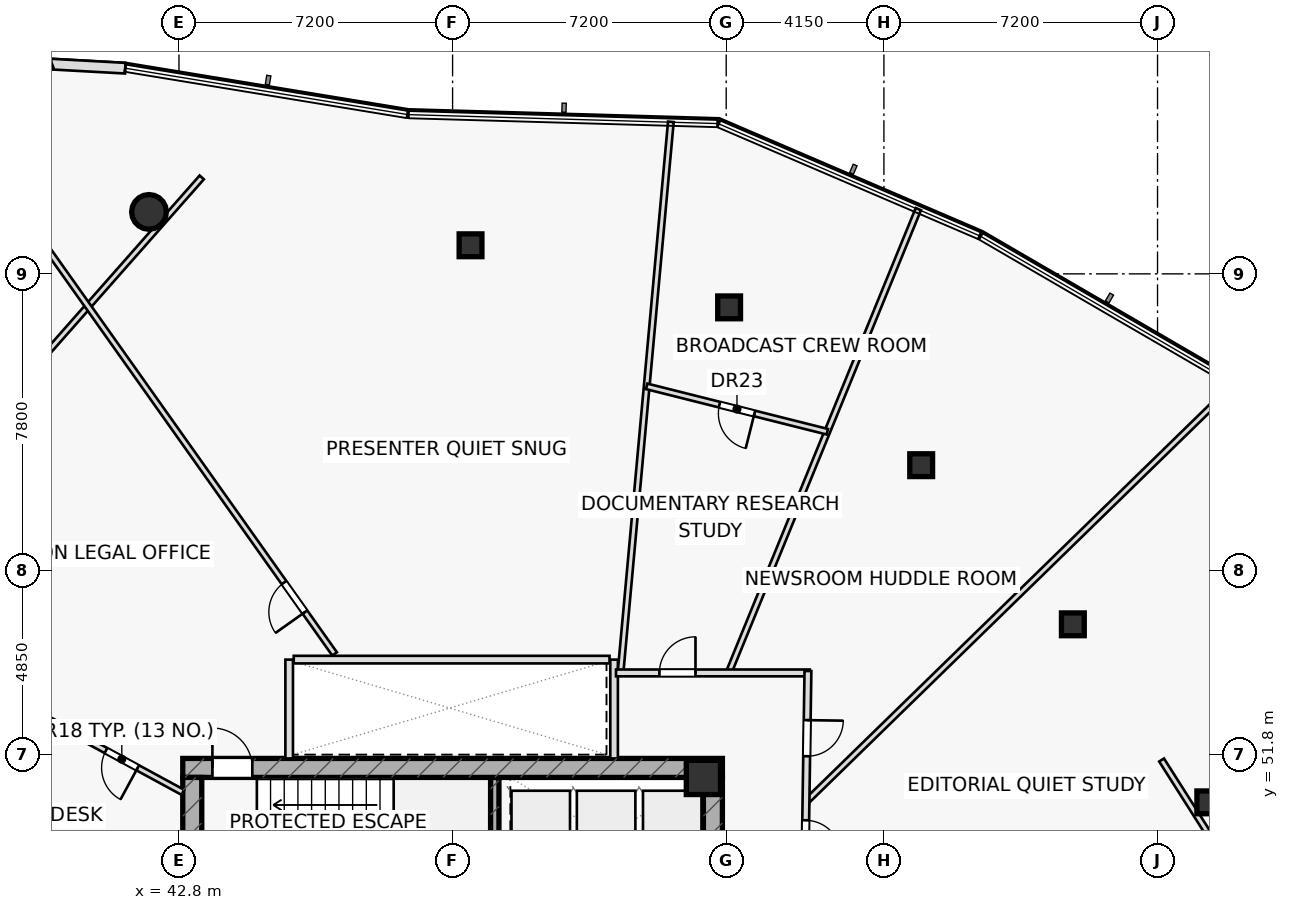
"""IFC4 building model, lengths in metres.
Left out: names, types, materials, properties, quantities, classifications, styles, units other than length and angle.
Written with IfcOpenShell. Run it as: python <this file> out.ifc"""

import sys

from ifc_helpers import new_model, si_unit, direction, frame, frame_2d, origin, origin_2d, place, context, subcontext, project, spatial, rectangle, hollow_rectangle, hollow_circle, extrude, element, fill, save


model = new_model("IFC4")
c1 = context("Model", 3, precision=1e-05, world=origin(), true_north=direction((0.0, 1.0)))
c2 = subcontext(c1, "Body", "Model", "MODEL_VIEW")
j1 = project(units=[si_unit("LENGTHUNIT", "METRE"), si_unit("PLANEANGLEUNIT", "RADIAN")], contexts=[c1])
p1 = place(None, origin())
s1 = spatial("IfcSite", under=j1, at=p1, CompositionType="ELEMENT")
p2 = place(p1, origin())
s2 = spatial("IfcBuilding", under=s1, at=p2, CompositionType="ELEMENT")
p3 = place(p2, frame((0.0, 0.0, 173.35)))
s3 = spatial("IfcBuildingStorey", under=s2, at=p3, CompositionType="ELEMENT", Elevation=173.35)
p4 = place(p3, frame((51.11, 48.1, 0.0), z_axis=(0.0, 0.0, 1.0), x_axis=(0.0, 1.0, 0.0)))
e1 = element("IfcWall", 1, at=p4, inside=s3, PredefinedType="SHEAR", context=c2, shape_type="SweptSolid", body=[
    extrude(rectangle(XDim=3.1, YDim=0.22, at=frame_2d((1.55, 0.0))), origin(), (0.0, 0.0, 1.0), 3.55),
])
p5 = place(p3, frame((42.9, 51.45, 0.0), z_axis=(0.0, 0.0, 1.0), x_axis=(1.0, 0.0, 0.0)))
e2 = element("IfcWall", 2, at=p5, inside=s3, PredefinedType="SHEAR", context=c2, shape_type="SweptSolid", body=[
    extrude(rectangle(XDim=14.2, YDim=0.5, at=frame_2d((7.1, 0.0))), origin(), (0.0, 0.0, 1.0), 3.55),
])
p6 = place(p5, frame((0.78, 0.0, 0.0)))
e3 = element("IfcOpeningElement", 3, at=p6, cuts=e2, PredefinedType="OPENING", context=c2, shape_type="SweptSolid", body=[
    extrude(rectangle(XDim=1.05, YDim=2.2, at=frame_2d((0.525, 1.1))), frame((0.0, 0.26, 0.0), z_axis=(0.0, -1.0, 0.0), x_axis=(1.0, 0.0, 0.0)), (0.0, 0.0, 1.0), 0.52),
])
p7 = place(p3, frame((43.15, 38.8, 0.0), z_axis=(0.0, 0.0, 1.0), x_axis=(0.0, 1.0, 0.0)))
e4 = element("IfcWall", 4, at=p7, inside=s3, PredefinedType="SHEAR", context=c2, shape_type="SweptSolid", body=[
    extrude(rectangle(XDim=12.4, YDim=0.5, at=frame_2d((6.2, 0.0))), origin(), (0.0, 0.0, 1.0), 3.55),
])
p8 = place(p3, frame((56.85, 38.8, 0.0), z_axis=(0.0, 0.0, 1.0), x_axis=(0.0, 1.0, 0.0)))
e5 = element("IfcWall", 5, at=p8, inside=s3, PredefinedType="SHEAR", context=c2, shape_type="SweptSolid", body=[
    extrude(rectangle(XDim=12.4, YDim=0.5, at=frame_2d((6.2, 0.0))), origin(), (0.0, 0.0, 1.0), 3.55),
])
p9 = place(p8, frame((3.85, 0.0, 0.0)))
e6 = element("IfcOpeningElement", 6, at=p9, cuts=e5, PredefinedType="OPENING", context=c2, shape_type="SweptSolid", body=[
    extrude(rectangle(XDim=1.5, YDim=2.2, at=frame_2d((0.75, 1.1))), frame((0.0, 0.26, 0.0), z_axis=(0.0, -1.0, 0.0), x_axis=(1.0, 0.0, 0.0)), (0.0, 0.0, 1.0), 0.52),
])
p10 = place(p3, frame((56.6, 51.2, 0.0), z_axis=(0.0, 0.0, 1.0), x_axis=(1.0, 0.0, 0.0)))
e7 = element("IfcColumn", 7, at=p10, inside=s3, PredefinedType="COLUMN", context=c2, shape_type="SweptSolid", body=[
    extrude(rectangle(XDim=0.9, YDim=0.9, at=origin_2d()), origin(), (0.0, 0.0, 1.0), 3.55),
])
p11 = place(p3, frame((42.011, 66.08, 0.0), z_axis=(0.0, 0.0, 1.0), x_axis=(1.0, 0.0, 0.0)))
e8 = element("IfcColumn", 8, at=p11, inside=s3, PredefinedType="COLUMN", context=c2, shape_type="SweptSolid", body=[
    extrude(hollow_circle(Radius=0.457, WallThickness=0.04, at=origin_2d()), origin(), (0.0, 0.0, 1.0), 3.55),
])
for number, where, z_axis, x_axis in (
    (9, (69.886, 50.544, 0.0), (0.0, 0.0, 1.0), (1.0, 0.0, 0.0)),
    (10, (66.322, 55.229, 0.0), (0.0, 0.0, 1.0), (1.0, 0.0, 0.0)),
    (11, (62.331, 59.416, 0.0), (0.0, 0.0, 1.0), (1.0, 0.0, 0.0)),
    (12, (57.277, 63.568, 0.0), (0.0, 0.0, 1.0), (1.0, 0.0, 0.0)),
    (13, (50.472, 65.202, 0.0), (0.0, 0.0, 1.0), (1.0, 0.0, 0.0)),
):
    element("IfcColumn", number, at=place(p3, frame(where, z_axis=z_axis, x_axis=x_axis)), inside=s3, PredefinedType="COLUMN", context=c2, shape_type="SweptSolid", body=[
        extrude(hollow_rectangle(XDim=0.6, YDim=0.6, WallThickness=0.036, at=origin_2d()), origin(), (0.0, 0.0, 1.0), 3.55),
    ])
for number, where, z_axis, x_axis in (
    (14, (45.7, 51.7, 0.0), (0.0, 0.0, 1.0), (0.0, 1.0, 0.0)),
    (15, (54.25, 51.7, 0.0), (0.0, 0.0, 1.0), (0.0, 1.0, 0.0)),
):
    element("IfcWall", number, at=place(p3, frame(where, z_axis=z_axis, x_axis=x_axis)), inside=s3, PredefinedType="PARTITIONING", context=c2, shape_type="SweptSolid", body=[
        extrude(rectangle(XDim=2.6, YDim=0.2, at=frame_2d((1.3, 0.0))), origin(), (0.0, 0.0, 1.0), 3.55),
    ])
p12 = place(p3, frame((43.4, 66.989, 0.0), z_axis=(0.0, 0.0, 1.0), x_axis=(-0.661622343701, -0.749837231881, 0.0)))
e16 = element("IfcWall", 16, at=p12, inside=s3, PredefinedType="PARTITIONING", context=c2, shape_type="SweptSolid", body=[
    extrude(rectangle(XDim=11.427, YDim=0.15, at=frame_2d((5.714, 0.0))), origin(), (0.0, 0.0, 1.0), 2.935),
])
p13 = place(p3, frame((74.163, 42.993, 0.0), z_axis=(0.0, 0.0, 1.0), x_axis=(-0.53628142437, 0.844039237166, 0.0)))
e17 = element("IfcWall", 17, at=p13, inside=s3, PredefinedType="PARTITIONING", context=c2, shape_type="SweptSolid", body=[
    extrude(rectangle(XDim=10.267, YDim=0.15, at=frame_2d((5.133, 0.0))), origin(), (0.0, 0.0, 1.0), 2.935),
])
p14 = place(p3, frame((42.9, 50.81, 0.0), z_axis=(0.0, 0.0, 1.0), x_axis=(-0.878812674831, 0.477166933637, 0.0)))
e18 = element("IfcWall", 18, at=p14, inside=s3, PredefinedType="PARTITIONING", context=c2, shape_type="SweptSolid", body=[
    extrude(rectangle(XDim=10.765, YDim=0.15, at=frame_2d((5.383, 0.0))), origin(), (0.0, 0.0, 1.0), 2.935),
])
p15 = place(p14, frame((1.35, 0.0, 0.0)))
e19 = element("IfcOpeningElement", 19, at=p15, cuts=e18, PredefinedType="OPENING", context=c2, shape_type="SweptSolid", body=[
    extrude(rectangle(XDim=0.95, YDim=2.05, at=frame_2d((0.475, 1.025))), frame((0.0, 0.085, 0.0), z_axis=(0.0, -1.0, 0.0), x_axis=(1.0, 0.0, 0.0)), (0.0, 0.0, 1.0), 0.17),
])
p16 = place(p3, frame((59.299, 50.556, 0.0), z_axis=(0.0, 0.0, 1.0), x_axis=(0.716060673245, 0.698038044975, 0.0)))
e20 = element("IfcWall", 20, at=p16, inside=s3, PredefinedType="PARTITIONING", context=c2, shape_type="SweptSolid", body=[
    extrude(rectangle(XDim=15.673, YDim=0.15, at=frame_2d((7.836, 0.0))), origin(), (0.0, 0.0, 1.0), 2.935),
])
p17 = place(p3, frame((57.262, 53.95, 0.0), z_axis=(0.0, 0.0, 1.0), x_axis=(0.378711423927, 0.925514806682, 0.0)))
e21 = element("IfcWall", 21, at=p17, inside=s3, PredefinedType="PARTITIONING", context=c2, shape_type="SweptSolid", body=[
    extrude(rectangle(XDim=13.187, YDim=0.15, at=frame_2d((6.593, 0.0))), origin(), (0.0, 0.0, 1.0), 3.025),
])
p18 = place(p3, frame((54.418, 53.95, 0.0), z_axis=(0.0, 0.0, 1.0), x_axis=(0.091045205829, 0.995846760549, 0.0)))
e22 = element("IfcWall", 22, at=p18, inside=s3, PredefinedType="PARTITIONING", context=c2, shape_type="SweptSolid", body=[
    extrude(rectangle(XDim=14.561, YDim=0.15, at=frame_2d((7.28, 0.0))), origin(), (0.0, 0.0, 1.0), 2.935),
])
p19 = place(p3, frame((46.896, 54.45, 0.0), z_axis=(0.0, 0.0, 1.0), x_axis=(-0.578632017692, 0.815588737111, 0.0)))
e23 = element("IfcWall", 23, at=p19, inside=s3, PredefinedType="PARTITIONING", context=c2, shape_type="SweptSolid", body=[
    extrude(rectangle(XDim=17.264, YDim=0.15, at=frame_2d((8.632, 0.0))), origin(), (0.0, 0.0, 1.0), 2.935),
])
p20 = place(p19, frame((1.35, 0.0, 0.0)))
e24 = element("IfcOpeningElement", 24, at=p20, cuts=e23, PredefinedType="OPENING", context=c2, shape_type="SweptSolid", body=[
    extrude(rectangle(XDim=0.95, YDim=2.05, at=frame_2d((0.475, 1.025))), frame((0.0, 0.085, 0.0), z_axis=(0.0, -1.0, 0.0), x_axis=(1.0, 0.0, 0.0)), (0.0, 0.0, 1.0), 0.17),
])
p21 = place(p3, frame((59.859, 60.296, 0.0), z_axis=(0.0, 0.0, 1.0), x_axis=(-0.969866322162, 0.243637675935, 0.0)))
e25 = element("IfcWall", 25, at=p21, inside=s3, PredefinedType="PARTITIONING", context=c2, shape_type="SweptSolid", body=[
    extrude(rectangle(XDim=4.899, YDim=0.15, at=frame_2d((2.45, 0.0))), origin(), (0.0, 0.0, 1.0), 2.935),
])
p22 = place(p21, frame((1.975, 0.0, 0.0)))
e26 = element("IfcOpeningElement", 26, at=p22, cuts=e25, PredefinedType="OPENING", context=c2, shape_type="SweptSolid", body=[
    extrude(rectangle(XDim=0.95, YDim=2.05, at=frame_2d((0.475, 1.025))), frame((0.0, 0.085, 0.0), z_axis=(0.0, -1.0, 0.0), x_axis=(1.0, 0.0, 0.0)), (0.0, 0.0, 1.0), 0.17),
])
p23 = place(p3, frame((54.3, 53.95, 0.0), z_axis=(0.0, 0.0, 1.0), x_axis=(1.0, 0.0, 0.0)))
e27 = element("IfcWall", 27, at=p23, inside=s3, PredefinedType="PARTITIONING", context=c2, shape_type="SweptSolid", body=[
    extrude(rectangle(XDim=5.1, YDim=0.18, at=frame_2d((2.55, 0.0))), origin(), (0.0, 0.0, 1.0), 2.935),
])
p24 = place(p23, frame((1.142, 0.0, 0.0)))
e28 = element("IfcOpeningElement", 28, at=p24, cuts=e27, PredefinedType="OPENING", context=c2, shape_type="SweptSolid", body=[
    extrude(rectangle(XDim=0.95, YDim=2.05, at=frame_2d((0.475, 1.025))), frame((0.0, 0.1, 0.0), z_axis=(0.0, -1.0, 0.0), x_axis=(1.0, 0.0, 0.0)), (0.0, 0.0, 1.0), 0.2),
])
p25 = place(p3, frame((59.351, 54.0, 0.0), z_axis=(0.0, 0.0, 1.0), x_axis=(-0.014903899768, -0.999888930718, 0.0)))
e29 = element("IfcWall", 29, at=p25, inside=s3, PredefinedType="PARTITIONING", context=c2, shape_type="SweptSolid", body=[
    extrude(rectangle(XDim=5.701, YDim=0.18, at=frame_2d((2.85, 0.0))), origin(), (0.0, 0.0, 1.0), 2.935),
])
p26 = place(p25, frame((1.292, 0.0, 0.0)))
e30 = element("IfcOpeningElement", 30, at=p26, cuts=e29, PredefinedType="OPENING", context=c2, shape_type="SweptSolid", body=[
    extrude(rectangle(XDim=0.95, YDim=2.05, at=frame_2d((0.475, 1.025))), frame((0.0, 0.1, 0.0), z_axis=(0.0, -1.0, 0.0), x_axis=(1.0, 0.0, 0.0)), (0.0, 0.0, 1.0), 0.2),
])
p27 = place(p25, frame((3.927, 0.0, 0.0)))
e31 = element("IfcOpeningElement", 31, at=p27, cuts=e29, PredefinedType="OPENING", context=c2, shape_type="SweptSolid", body=[
    extrude(rectangle(XDim=0.95, YDim=2.05, at=frame_2d((0.475, 1.025))), frame((0.0, 0.1, 0.0), z_axis=(0.0, -1.0, 0.0), x_axis=(1.0, 0.0, 0.0)), (0.0, 0.0, 1.0), 0.2),
])
p28 = place(p3, frame((41.389, 69.862, 0.0), z_axis=(0.0, 0.0, 1.0), x_axis=(-0.998486279367, 0.055001362847, 0.0)))
e32 = element("IfcWall", 32, at=p28, inside=s3, PredefinedType="STANDARD", context=c2, shape_type="SweptSolid", body=[
    extrude(rectangle(XDim=1.962, YDim=0.28, at=frame_2d((0.981, 0.0))), origin(), (0.0, 0.0, 1.0), 3.55),
])
p29 = place(p3, frame((39.459, 69.974, 0.0), z_axis=(0.0, 0.0, 1.0), x_axis=(-0.932604798359, -0.360899279687, 0.0)))
e33 = element("IfcWall", 33, at=p29, inside=s3, PredefinedType="STANDARD", context=c2, shape_type="SweptSolid", body=[
    extrude(rectangle(XDim=1.95, YDim=0.28, at=frame_2d((0.975, 0.0))), origin(), (0.0, 0.0, 1.0), 3.55),
])
p30 = place(p3, frame((45.82, 54.3, 0.0), z_axis=(0.0, 0.0, 1.0), x_axis=(1.0, 0.0, 0.0)))
e34 = element("IfcWall", 34, at=p30, inside=s3, PredefinedType="PARTITIONING", context=c2, shape_type="SweptSolid", body=[
    extrude(rectangle(XDim=8.31, YDim=0.2, at=frame_2d((4.155, 0.0))), origin(), (0.0, 0.0, 1.0), 3.55),
])
p31 = place(p6, origin())
e35 = element("IfcDoor", 35, at=p31, inside=s3, OperationType="SINGLE_SWING_LEFT", PredefinedType="DOOR", context=c2, shape_type="SweptSolid", body=[
    extrude(rectangle(XDim=1.05, YDim=2.2, at=frame_2d((0.525, 1.1))), frame((0.0, 0.025, 0.0), z_axis=(0.0, -1.0, 0.0), x_axis=(1.0, 0.0, 0.0)), (0.0, 0.0, 1.0), 0.05),
])
fill(e3, e35)
p32 = place(p15, origin())
e36 = element("IfcDoor", 36, at=p32, inside=s3, OperationType="SINGLE_SWING_LEFT", PredefinedType="DOOR", context=c2, shape_type="SweptSolid", body=[
    extrude(rectangle(XDim=0.95, YDim=2.05, at=frame_2d((0.475, 1.025))), frame((0.0, 0.025, 0.0), z_axis=(0.0, -1.0, 0.0), x_axis=(1.0, 0.0, 0.0)), (0.0, 0.0, 1.0), 0.05),
])
fill(e19, e36)
p33 = place(p20, origin())
e37 = element("IfcDoor", 37, at=p33, inside=s3, OperationType="SINGLE_SWING_LEFT", PredefinedType="DOOR", context=c2, shape_type="SweptSolid", body=[
    extrude(rectangle(XDim=0.95, YDim=2.05, at=frame_2d((0.475, 1.025))), frame((0.0, 0.025, 0.0), z_axis=(0.0, -1.0, 0.0), x_axis=(1.0, 0.0, 0.0)), (0.0, 0.0, 1.0), 0.05),
])
fill(e24, e37)
p34 = place(p22, origin())
e38 = element("IfcDoor", 38, at=p34, inside=s3, OperationType="SINGLE_SWING_LEFT", PredefinedType="DOOR", context=c2, shape_type="SweptSolid", body=[
    extrude(rectangle(XDim=0.95, YDim=2.05, at=frame_2d((0.475, 1.025))), frame((0.0, 0.025, 0.0), z_axis=(0.0, -1.0, 0.0), x_axis=(1.0, 0.0, 0.0)), (0.0, 0.0, 1.0), 0.05),
])
fill(e26, e38)
p35 = place(p24, origin())
e39 = element("IfcDoor", 39, at=p35, inside=s3, OperationType="SINGLE_SWING_RIGHT", PredefinedType="DOOR", context=c2, shape_type="SweptSolid", body=[
    extrude(rectangle(XDim=0.95, YDim=2.05, at=frame_2d((0.475, 1.025))), frame((0.0, 0.025, 0.0), z_axis=(0.0, -1.0, 0.0), x_axis=(1.0, 0.0, 0.0)), (0.0, 0.0, 1.0), 0.05),
])
fill(e28, e39)
p36 = place(p26, origin())
e40 = element("IfcDoor", 40, at=p36, inside=s3, OperationType="SINGLE_SWING_LEFT", PredefinedType="DOOR", context=c2, shape_type="SweptSolid", body=[
    extrude(rectangle(XDim=0.95, YDim=2.05, at=frame_2d((0.475, 1.025))), frame((0.0, 0.025, 0.0), z_axis=(0.0, -1.0, 0.0), x_axis=(1.0, 0.0, 0.0)), (0.0, 0.0, 1.0), 0.05),
])
fill(e30, e40)
p37 = place(p27, origin())
e41 = element("IfcDoor", 41, at=p37, inside=s3, OperationType="SINGLE_SWING_RIGHT", PredefinedType="DOOR", context=c2, shape_type="SweptSolid", body=[
    extrude(rectangle(XDim=0.95, YDim=2.05, at=frame_2d((0.475, 1.025))), frame((0.0, 0.025, 0.0), z_axis=(0.0, -1.0, 0.0), x_axis=(1.0, 0.0, 0.0)), (0.0, 0.0, 1.0), 0.05),
])
fill(e31, e41)
save(model, sys.argv[1])
